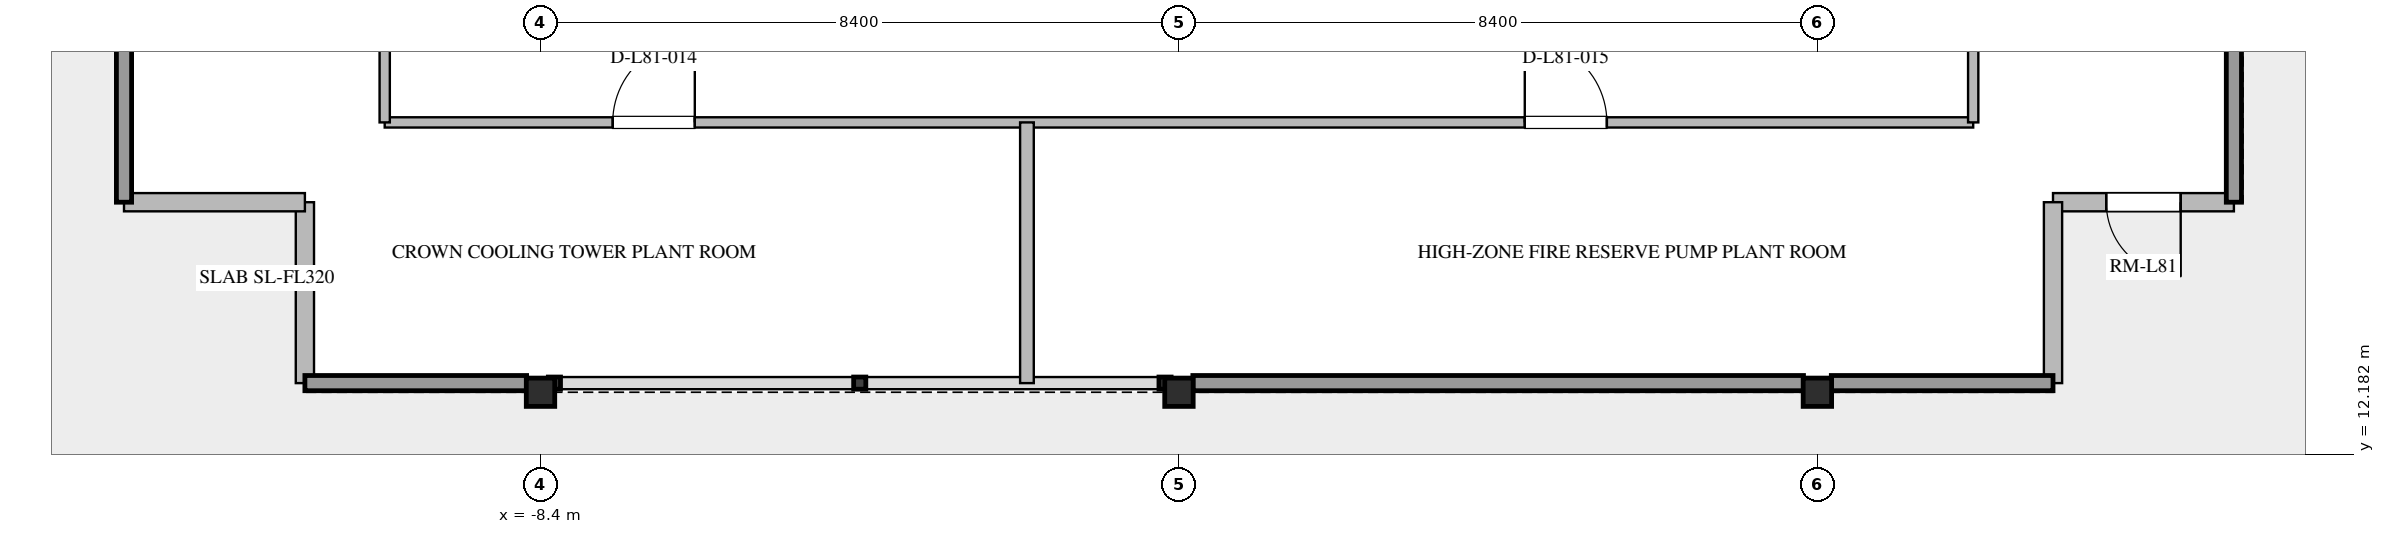
"""IFC4 building model, lengths in metres.
Left out: names, types, materials, properties, quantities, classifications, styles, units other than length and angle.
Written with IfcOpenShell. Run it as: python <this file> out.ifc"""

import sys

from ifc_helpers import new_model, si_unit, direction, frame, frame_2d, origin, origin_2d, place, context, subcontext, project, spatial, rectangle, i_section, extrude, element, fill, save


model = new_model("IFC4")
c1 = context("Model", 3, precision=1e-05, world=origin(), true_north=direction((0.0, 1.0)))
c2 = subcontext(c1, "Body", "Model", "MODEL_VIEW")
j1 = project(units=[si_unit("LENGTHUNIT", "METRE"), si_unit("PLANEANGLEUNIT", "RADIAN")], contexts=[c1])
p1 = place(None, origin())
s1 = spatial("IfcSite", under=j1, at=p1, CompositionType="ELEMENT")
p2 = place(p1, origin())
s2 = spatial("IfcBuilding", under=s1, at=p2, CompositionType="ELEMENT")
p3 = place(p2, frame((0.0, 0.0, 311.4)))
s3 = spatial("IfcBuildingStorey", under=s2, at=p3, CompositionType="ELEMENT", Elevation=311.4)
for number, where, z_axis, x_axis in (
    (1, (-8.4, 13.0, -0.32), (0.0, 0.0, 1.0), (1.0, 0.0, 0.0)),
    (2, (0.0, 13.0, -0.32), (0.0, 0.0, 1.0), (1.0, 0.0, 0.0)),
    (3, (8.4, 13.0, -0.32), (0.0, 0.0, 1.0), (1.0, 0.0, 0.0)),
):
    element("IfcColumn", number, at=place(p3, frame(where, z_axis=z_axis, x_axis=x_axis)), inside=s3, PredefinedType="COLUMN", context=c2, shape_type="SweptSolid", body=[
        extrude(i_section(OverallWidth=0.374, OverallDepth=0.372, WebThickness=0.016, FlangeThickness=0.026, FilletRadius=0.025, at=origin_2d()), origin(), (0.0, 0.0, 1.0), 4.317),
    ])
for number, where, z_axis, x_axis in (
    (4, (-11.5, 13.12, 0.0), (0.0, 0.0, 1.0), (0.0, 1.0, 0.0)),
    (5, (-11.5, 15.5, 0.0), (0.0, 0.0, 1.0), (-1.0, 0.0, 0.0)),
):
    element("IfcWall", number, at=place(p3, frame(where, z_axis=z_axis, x_axis=x_axis)), inside=s3, PredefinedType="STANDARD", context=c2, shape_type="SweptSolid", body=[
        extrude(rectangle(XDim=2.38, YDim=0.24, at=frame_2d((1.19, 0.0))), origin(), (0.0, 0.0, 1.0), 3.68),
    ])
p4 = place(p3, frame((13.88, 15.5, 0.0), z_axis=(0.0, 0.0, 1.0), x_axis=(-1.0, 0.0, 0.0)))
e6 = element("IfcWall", 6, at=p4, inside=s3, PredefinedType="STANDARD", context=c2, shape_type="SweptSolid", body=[
    extrude(rectangle(XDim=2.38, YDim=0.24, at=frame_2d((1.19, 0.0))), origin(), (0.0, 0.0, 1.0), 3.68),
])
p5 = place(p4, frame((0.7, 0.0, 0.0)))
e7 = element("IfcOpeningElement", 7, at=p5, cuts=e6, PredefinedType="OPENING", context=c2, shape_type="SweptSolid", body=[
    extrude(rectangle(XDim=0.98, YDim=2.1, at=frame_2d((0.49, 1.05))), frame((0.0, 0.13, 0.0), z_axis=(0.0, -1.0, 0.0), x_axis=(1.0, 0.0, 0.0)), (0.0, 0.0, 1.0), 0.26),
])
p6 = place(p3, frame((11.5, 15.5, 0.0), z_axis=(0.0, 0.0, 1.0), x_axis=(0.0, -1.0, 0.0)))
e8 = element("IfcWall", 8, at=p6, inside=s3, PredefinedType="STANDARD", context=c2, shape_type="SweptSolid", body=[
    extrude(rectangle(XDim=2.38, YDim=0.24, at=frame_2d((1.19, 0.0))), origin(), (0.0, 0.0, 1.0), 3.68),
])
p7 = place(p3, frame((-10.45, 16.55, 0.0), z_axis=(0.0, 0.0, 1.0), x_axis=(1.0, 0.0, 0.0)))
e9 = element("IfcWall", 9, at=p7, inside=s3, PredefinedType="PARTITIONING", context=c2, shape_type="SweptSolid", body=[
    extrude(rectangle(XDim=20.9, YDim=0.135, at=frame_2d((10.45, 0.0))), origin(), (0.0, 0.0, 1.0), 3.68),
])
p8 = place(p7, frame((3.0, 0.0, 0.0)))
e10 = element("IfcOpeningElement", 10, at=p8, cuts=e9, PredefinedType="OPENING", context=c2, shape_type="SweptSolid", body=[
    extrude(rectangle(XDim=1.08, YDim=2.04, at=frame_2d((0.54, 1.02))), frame((0.0, 0.077, 0.0), z_axis=(0.0, -1.0, 0.0), x_axis=(1.0, 0.0, 0.0)), (0.0, 0.0, 1.0), 0.155),
])
p9 = place(p7, frame((15.0, 0.0, 0.0)))
e11 = element("IfcOpeningElement", 11, at=p9, cuts=e9, PredefinedType="OPENING", context=c2, shape_type="SweptSolid", body=[
    extrude(rectangle(XDim=1.08, YDim=2.04, at=frame_2d((0.54, 1.02))), frame((0.0, 0.077, 0.0), z_axis=(0.0, -1.0, 0.0), x_axis=(1.0, 0.0, 0.0)), (0.0, 0.0, 1.0), 0.155),
])
p10 = place(p3, frame((-10.45, 16.55, 0.0), z_axis=(0.0, 0.0, 1.0), x_axis=(0.0, 1.0, 0.0)))
e12 = element("IfcWall", 12, at=p10, inside=s3, PredefinedType="PARTITIONING", context=c2, shape_type="SweptSolid", body=[
    extrude(rectangle(XDim=20.9, YDim=0.135, at=frame_2d((10.45, 0.0))), origin(), (0.0, 0.0, 1.0), 3.68),
])
p11 = place(p10, frame((8.0, 0.0, 0.0)))
e13 = element("IfcOpeningElement", 13, at=p11, cuts=e12, PredefinedType="OPENING", context=c2, shape_type="SweptSolid", body=[
    extrude(rectangle(XDim=1.08, YDim=2.04, at=frame_2d((0.54, 1.02))), frame((0.0, 0.077, 0.0), z_axis=(0.0, -1.0, 0.0), x_axis=(1.0, 0.0, 0.0)), (0.0, 0.0, 1.0), 0.155),
])
p12 = place(p3, frame((10.45, 16.55, 0.0), z_axis=(0.0, 0.0, 1.0), x_axis=(0.0, 1.0, 0.0)))
e14 = element("IfcWall", 14, at=p12, inside=s3, PredefinedType="PARTITIONING", context=c2, shape_type="SweptSolid", body=[
    extrude(rectangle(XDim=20.9, YDim=0.135, at=frame_2d((10.45, 0.0))), origin(), (0.0, 0.0, 1.0), 3.68),
])
p13 = place(p12, frame((8.0, 0.0, 0.0)))
e15 = element("IfcOpeningElement", 15, at=p13, cuts=e14, PredefinedType="OPENING", context=c2, shape_type="SweptSolid", body=[
    extrude(rectangle(XDim=1.08, YDim=2.04, at=frame_2d((0.54, 1.02))), frame((0.0, 0.077, 0.0), z_axis=(0.0, -1.0, 0.0), x_axis=(1.0, 0.0, 0.0)), (0.0, 0.0, 1.0), 0.155),
])
p14 = place(p3, frame((-2.0, 13.12, 0.0), z_axis=(0.0, 0.0, 1.0), x_axis=(0.0, 1.0, 0.0)))
e16 = element("IfcWall", 16, at=p14, inside=s3, PredefinedType="SOLIDWALL", context=c2, shape_type="SweptSolid", body=[
    extrude(rectangle(XDim=3.43, YDim=0.18, at=frame_2d((1.715, 0.0))), origin(), (0.0, 0.0, 1.0), 3.68),
])
p15 = place(p8, origin())
e17 = element("IfcDoor", 17, at=p15, inside=s3, OperationType="SINGLE_SWING_RIGHT", PredefinedType="DOOR", context=c2, shape_type="SweptSolid", body=[
    extrude(rectangle(XDim=1.08, YDim=2.04, at=frame_2d((0.54, 1.02))), frame((0.0, 0.025, 0.0), z_axis=(0.0, -1.0, 0.0), x_axis=(1.0, 0.0, 0.0)), (0.0, 0.0, 1.0), 0.05),
])
fill(e10, e17)
p16 = place(p9, origin())
e18 = element("IfcDoor", 18, at=p16, inside=s3, OperationType="SINGLE_SWING_LEFT", PredefinedType="DOOR", context=c2, shape_type="SweptSolid", body=[
    extrude(rectangle(XDim=1.08, YDim=2.04, at=frame_2d((0.54, 1.02))), frame((0.0, 0.025, 0.0), z_axis=(0.0, -1.0, 0.0), x_axis=(1.0, 0.0, 0.0)), (0.0, 0.0, 1.0), 0.05),
])
fill(e11, e18)
p17 = place(p5, origin())
e19 = element("IfcDoor", 19, at=p17, inside=s3, OperationType="SINGLE_SWING_LEFT", PredefinedType="DOOR", context=c2, shape_type="SweptSolid", body=[
    extrude(rectangle(XDim=0.98, YDim=2.1, at=frame_2d((0.49, 1.05))), frame((0.0, 0.025, 0.0), z_axis=(0.0, -1.0, 0.0), x_axis=(1.0, 0.0, 0.0)), (0.0, 0.0, 1.0), 0.05),
])
fill(e7, e19)
save(model, sys.argv[1])
